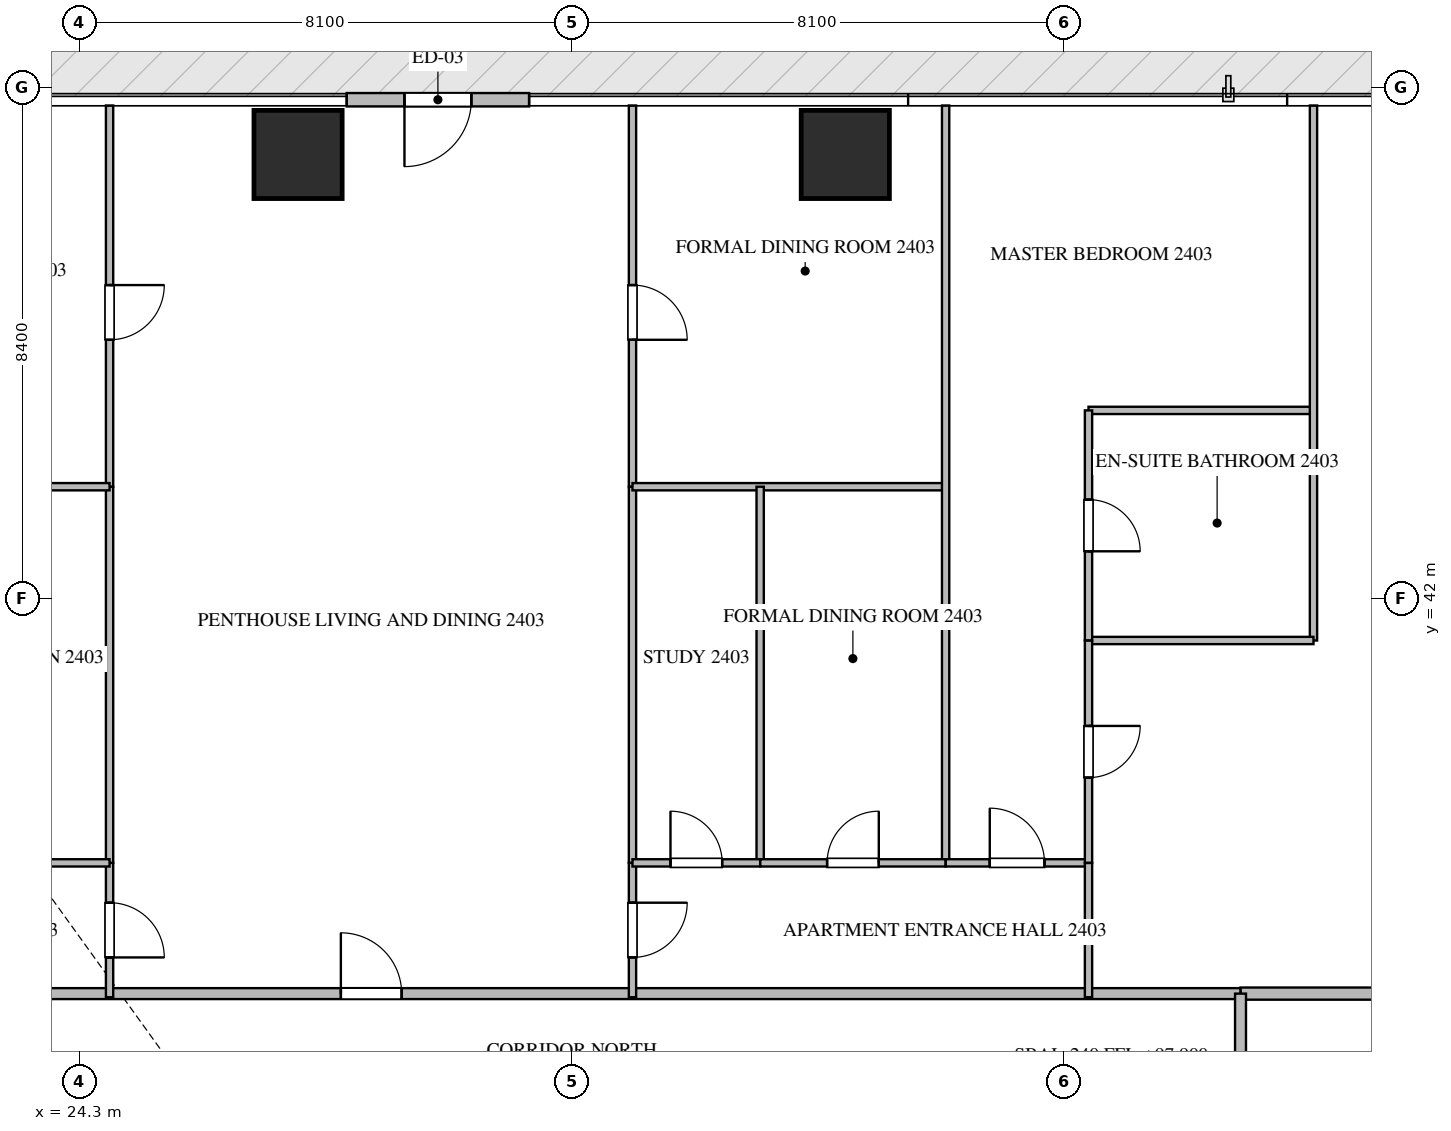
"""IFC4 building model, lengths in metres.
Left out: names, types, materials, properties, quantities, classifications, styles, units other than length and angle.
Written with IfcOpenShell. Run it as: python <this file> out.ifc"""

import sys

from ifc_helpers import new_model, si_unit, direction, frame, frame_2d, origin, origin_2d, place, context, subcontext, project, spatial, rectangle, extrude, source, transform, mapped, element, fill, save


model = new_model("IFC4")
c1 = context("Model", 3, precision=1e-05, world=origin(), true_north=direction((0.0, 1.0)))
c2 = subcontext(c1, "Body", "Model", "MODEL_VIEW")
j1 = project(units=[si_unit("LENGTHUNIT", "METRE"), si_unit("PLANEANGLEUNIT", "RADIAN")], contexts=[c1])
p1 = place(None, origin())
s1 = spatial("IfcSite", under=j1, at=p1, CompositionType="ELEMENT")
p2 = place(p1, origin())
s2 = spatial("IfcBuilding", under=s1, at=p2, CompositionType="ELEMENT")
p3 = place(p2, frame((0.0, 0.0, 97.95)))
s3 = spatial("IfcBuildingStorey", under=s2, at=p3, CompositionType="ELEMENT", Elevation=97.95)
m1 = source(origin(), c2, "Body", "SweptSolid", [
    extrude(rectangle(XDim=1.45, YDim=1.45, at=origin_2d()), origin(), (0.0, 0.0, 1.0), 3.75),
])
for number, where, z_axis, x_axis in (
    (1, (27.9, 49.3, -0.26), (0.0, 0.0, 1.0), (1.0, 0.0, 0.0)),
    (2, (36.9, 49.3, -0.26), (0.0, 0.0, 1.0), (1.0, 0.0, 0.0)),
):
    element("IfcColumn", number, at=place(p3, frame(where, z_axis=z_axis, x_axis=x_axis)), inside=s3, PredefinedType="COLUMN", context=c2, shape_type="MappedRepresentation", body=[
        mapped(m1, transform((0.0, 0.0, 0.0), scale=1.0)),
    ])
p4 = place(p3, frame((31.7, 50.2, 0.0), z_axis=(0.0, 0.0, 1.0), x_axis=(-1.0, 0.0, 0.0)))
e3 = element("IfcWall", 3, at=p4, inside=s3, PredefinedType="ELEMENTEDWALL", context=c2, shape_type="SweptSolid", body=[
    extrude(rectangle(XDim=3.0, YDim=0.22, at=frame_2d((1.5, 0.0))), origin(), (0.0, 0.0, 1.0), 3.475),
])
p5 = place(p4, frame((0.95, 0.0, 0.0)))
e4 = element("IfcOpeningElement", 4, at=p5, cuts=e3, PredefinedType="OPENING", context=c2, shape_type="SweptSolid", body=[
    extrude(rectangle(XDim=1.1, YDim=2.2, at=frame_2d((0.55, 1.1))), frame((0.0, 0.12, 0.0), z_axis=(0.0, -1.0, 0.0), x_axis=(1.0, 0.0, 0.0)), (0.0, 0.0, 1.0), 0.24),
])
p6 = place(p3, frame((43.4, 35.5, 0.0), z_axis=(0.0, 0.0, 1.0), x_axis=(1.0, 0.0, 0.0)))
e5 = element("IfcWall", 5, at=p6, inside=s3, PredefinedType="PARTITIONING", context=c2, shape_type="SweptSolid", body=[
    extrude(rectangle(XDim=15.318, YDim=0.2, at=frame_2d((7.659, 0.0))), origin(), (0.0, 0.0, 1.0), 3.49),
])
p7 = place(p3, frame((21.402, 35.5, 0.0), z_axis=(0.0, 0.0, 1.0), x_axis=(1.0, 0.0, 0.0)))
e6 = element("IfcWall", 6, at=p7, inside=s3, PredefinedType="PARTITIONING", context=c2, shape_type="SweptSolid", body=[
    extrude(rectangle(XDim=21.996, YDim=0.18, at=frame_2d((10.998, 0.0))), origin(), (0.0, 0.0, 1.0), 3.49),
])
p8 = place(p7, frame((7.202, 0.0, 0.0)))
e7 = element("IfcOpeningElement", 7, at=p8, cuts=e6, PredefinedType="OPENING", context=c2, shape_type="SweptSolid", body=[
    extrude(rectangle(XDim=1.0, YDim=2.15, at=frame_2d((0.5, 1.075))), frame((0.0, 0.1, 0.0), z_axis=(0.0, -1.0, 0.0), x_axis=(1.0, 0.0, 0.0)), (0.0, 0.0, 1.0), 0.2),
])
p9 = place(p3, frame((43.4, 14.9, 0.0), z_axis=(0.0, 0.0, 1.0), x_axis=(0.0, 1.0, 0.0)))
e8 = element("IfcWall", 8, at=p9, inside=s3, PredefinedType="PARTITIONING", context=c2, shape_type="SweptSolid", body=[
    extrude(rectangle(XDim=20.6, YDim=0.18, at=frame_2d((10.3, 0.0))), origin(), (0.0, 0.0, 1.0), 3.49),
])
p10 = place(p9, frame((1.96, 0.0, 0.0)))
e9 = element("IfcOpeningElement", 9, at=p10, cuts=e8, PredefinedType="OPENING", context=c2, shape_type="SweptSolid", body=[
    extrude(rectangle(XDim=1.0, YDim=2.15, at=frame_2d((0.5, 1.075))), frame((0.0, 0.1, 0.0), z_axis=(0.0, -1.0, 0.0), x_axis=(1.0, 0.0, 0.0)), (0.0, 0.0, 1.0), 0.2),
])
p11 = place(p3, frame((24.8, 37.65, 0.0), z_axis=(0.0, 0.0, 1.0), x_axis=(0.0, -1.0, 0.0)))
e10 = element("IfcWall", 10, at=p11, inside=s3, PredefinedType="PARTITIONING", context=c2, shape_type="SweptSolid", body=[
    extrude(rectangle(XDim=2.21, YDim=0.12, at=frame_2d((1.105, 0.0))), origin(), (0.0, 0.0, 1.0), 3.49),
])
p12 = place(p11, frame((0.655, 0.0, 0.0)))
e11 = element("IfcOpeningElement", 11, at=p12, cuts=e10, PredefinedType="OPENING", context=c2, shape_type="SweptSolid", body=[
    extrude(rectangle(XDim=0.9, YDim=2.1, at=frame_2d((0.45, 1.05))), frame((0.0, 0.07, 0.0), z_axis=(0.0, -1.0, 0.0), x_axis=(1.0, 0.0, 0.0)), (0.0, 0.0, 1.0), 0.14),
])
p13 = place(p3, frame((24.8, 50.105, 0.0), z_axis=(0.0, 0.0, 1.0), x_axis=(0.0, -1.0, 0.0)))
e12 = element("IfcWall", 12, at=p13, inside=s3, PredefinedType="PARTITIONING", context=c2, shape_type="SweptSolid", body=[
    extrude(rectangle(XDim=6.269, YDim=0.12, at=frame_2d((3.135, 0.0))), origin(), (0.0, 0.0, 1.0), 3.49),
])
p14 = place(p13, frame((2.953, 0.0, 0.0)))
e13 = element("IfcOpeningElement", 13, at=p14, cuts=e12, PredefinedType="OPENING", context=c2, shape_type="SweptSolid", body=[
    extrude(rectangle(XDim=0.9, YDim=2.1, at=frame_2d((0.45, 1.05))), frame((0.0, 0.07, 0.0), z_axis=(0.0, -1.0, 0.0), x_axis=(1.0, 0.0, 0.0)), (0.0, 0.0, 1.0), 0.14),
])
p15 = place(p3, frame((24.8, 43.834, 0.0), z_axis=(0.0, 0.0, 1.0), x_axis=(0.0, -1.0, 0.0)))
e14 = element("IfcWall", 14, at=p15, inside=s3, PredefinedType="PARTITIONING", context=c2, shape_type="SweptSolid", body=[
    extrude(rectangle(XDim=6.182, YDim=0.12, at=frame_2d((3.091, 0.0))), origin(), (0.0, 0.0, 1.0), 3.49),
])
p16 = place(p3, frame((19.65, 43.836, 0.0), z_axis=(0.0, 0.0, 1.0), x_axis=(1.0, 0.0, 0.0)))
e15 = element("IfcWall", 15, at=p16, inside=s3, PredefinedType="PARTITIONING", context=c2, shape_type="SweptSolid", body=[
    extrude(rectangle(XDim=5.15, YDim=0.12, at=frame_2d((2.575, 0.0))), origin(), (0.0, 0.0, 1.0), 3.49),
])
p17 = place(p3, frame((21.752, 37.65, 0.0), z_axis=(0.0, 0.0, 1.0), x_axis=(1.0, 0.0, 0.0)))
e16 = element("IfcWall", 16, at=p17, inside=s3, PredefinedType="PARTITIONING", context=c2, shape_type="SweptSolid", body=[
    extrude(rectangle(XDim=3.048, YDim=0.12, at=frame_2d((1.524, 0.0))), origin(), (0.0, 0.0, 1.0), 3.49),
])
p18 = place(p17, frame((1.099, 0.0, 0.0)))
e17 = element("IfcOpeningElement", 17, at=p18, cuts=e16, PredefinedType="OPENING", context=c2, shape_type="SweptSolid", body=[
    extrude(rectangle(XDim=0.85, YDim=2.1, at=frame_2d((0.425, 1.05))), frame((0.0, 0.07, 0.0), z_axis=(0.0, -1.0, 0.0), x_axis=(1.0, 0.0, 0.0)), (0.0, 0.0, 1.0), 0.14),
])
p19 = place(p3, frame((33.4, 37.65, 0.0), z_axis=(0.0, 0.0, 1.0), x_axis=(0.0, -1.0, 0.0)))
e18 = element("IfcWall", 18, at=p19, inside=s3, PredefinedType="PARTITIONING", context=c2, shape_type="SweptSolid", body=[
    extrude(rectangle(XDim=2.21, YDim=0.12, at=frame_2d((1.105, 0.0))), origin(), (0.0, 0.0, 1.0), 3.49),
])
p20 = place(p19, frame((0.655, 0.0, 0.0)))
e19 = element("IfcOpeningElement", 19, at=p20, cuts=e18, PredefinedType="OPENING", context=c2, shape_type="SweptSolid", body=[
    extrude(rectangle(XDim=0.9, YDim=2.1, at=frame_2d((0.45, 1.05))), frame((0.0, 0.07, 0.0), z_axis=(0.0, -1.0, 0.0), x_axis=(1.0, 0.0, 0.0)), (0.0, 0.0, 1.0), 0.14),
])
p21 = place(p3, frame((33.4, 50.105, 0.0), z_axis=(0.0, 0.0, 1.0), x_axis=(0.0, -1.0, 0.0)))
e20 = element("IfcWall", 20, at=p21, inside=s3, PredefinedType="PARTITIONING", context=c2, shape_type="SweptSolid", body=[
    extrude(rectangle(XDim=6.269, YDim=0.12, at=frame_2d((3.135, 0.0))), origin(), (0.0, 0.0, 1.0), 3.49),
])
p22 = place(p21, frame((2.953, 0.0, 0.0)))
e21 = element("IfcOpeningElement", 21, at=p22, cuts=e20, PredefinedType="OPENING", context=c2, shape_type="SweptSolid", body=[
    extrude(rectangle(XDim=0.9, YDim=2.1, at=frame_2d((0.45, 1.05))), frame((0.0, 0.07, 0.0), z_axis=(0.0, -1.0, 0.0), x_axis=(1.0, 0.0, 0.0)), (0.0, 0.0, 1.0), 0.14),
])
p23 = place(p3, frame((33.4, 43.834, 0.0), z_axis=(0.0, 0.0, 1.0), x_axis=(0.0, -1.0, 0.0)))
e22 = element("IfcWall", 22, at=p23, inside=s3, PredefinedType="PARTITIONING", context=c2, shape_type="SweptSolid", body=[
    extrude(rectangle(XDim=6.182, YDim=0.12, at=frame_2d((3.091, 0.0))), origin(), (0.0, 0.0, 1.0), 3.49),
])
p24 = place(p3, frame((33.4, 43.836, 0.0), z_axis=(0.0, 0.0, 1.0), x_axis=(1.0, 0.0, 0.0)))
e23 = element("IfcWall", 23, at=p24, inside=s3, PredefinedType="PARTITIONING", context=c2, shape_type="SweptSolid", body=[
    extrude(rectangle(XDim=5.15, YDim=0.12, at=frame_2d((2.575, 0.0))), origin(), (0.0, 0.0, 1.0), 3.49),
])
p25 = place(p3, frame((38.55, 50.105, 0.0), z_axis=(0.0, 0.0, 1.0), x_axis=(0.0, -1.0, 0.0)))
e24 = element("IfcWall", 24, at=p25, inside=s3, PredefinedType="PARTITIONING", context=c2, shape_type="SweptSolid", body=[
    extrude(rectangle(XDim=12.455, YDim=0.12, at=frame_2d((6.228, 0.0))), origin(), (0.0, 0.0, 1.0), 3.49),
])
p26 = place(p3, frame((35.5, 43.836, 0.0), z_axis=(0.0, 0.0, 1.0), x_axis=(0.0, -1.0, 0.0)))
e25 = element("IfcWall", 25, at=p26, inside=s3, PredefinedType="PARTITIONING", context=c2, shape_type="SweptSolid", body=[
    extrude(rectangle(XDim=6.186, YDim=0.12, at=frame_2d((3.093, 0.0))), origin(), (0.0, 0.0, 1.0), 3.49),
])
p27 = place(p3, frame((33.4, 37.65, 0.0), z_axis=(0.0, 0.0, 1.0), x_axis=(1.0, 0.0, 0.0)))
e26 = element("IfcWall", 26, at=p27, inside=s3, PredefinedType="PARTITIONING", context=c2, shape_type="SweptSolid", body=[
    extrude(rectangle(XDim=2.1, YDim=0.12, at=frame_2d((1.05, 0.0))), origin(), (0.0, 0.0, 1.0), 3.49),
])
p28 = place(p27, frame((0.625, 0.0, 0.0)))
e27 = element("IfcOpeningElement", 27, at=p28, cuts=e26, PredefinedType="OPENING", context=c2, shape_type="SweptSolid", body=[
    extrude(rectangle(XDim=0.85, YDim=2.1, at=frame_2d((0.425, 1.05))), frame((0.0, 0.07, 0.0), z_axis=(0.0, -1.0, 0.0), x_axis=(1.0, 0.0, 0.0)), (0.0, 0.0, 1.0), 0.14),
])
p29 = place(p3, frame((35.502, 37.65, 0.0), z_axis=(0.0, 0.0, 1.0), x_axis=(1.0, 0.0, 0.0)))
e28 = element("IfcWall", 28, at=p29, inside=s3, PredefinedType="PARTITIONING", context=c2, shape_type="SweptSolid", body=[
    extrude(rectangle(XDim=3.048, YDim=0.12, at=frame_2d((1.524, 0.0))), origin(), (0.0, 0.0, 1.0), 3.49),
])
p30 = place(p29, frame((1.099, 0.0, 0.0)))
e29 = element("IfcOpeningElement", 29, at=p30, cuts=e28, PredefinedType="OPENING", context=c2, shape_type="SweptSolid", body=[
    extrude(rectangle(XDim=0.85, YDim=2.1, at=frame_2d((0.425, 1.05))), frame((0.0, 0.07, 0.0), z_axis=(0.0, -1.0, 0.0), x_axis=(1.0, 0.0, 0.0)), (0.0, 0.0, 1.0), 0.14),
])
p31 = place(p3, frame((38.552, 37.65, 0.0), z_axis=(0.0, 0.0, 1.0), x_axis=(1.0, 0.0, 0.0)))
e30 = element("IfcWall", 30, at=p31, inside=s3, PredefinedType="PARTITIONING", context=c2, shape_type="SweptSolid", body=[
    extrude(rectangle(XDim=2.348, YDim=0.12, at=frame_2d((1.174, 0.0))), origin(), (0.0, 0.0, 1.0), 3.49),
])
p32 = place(p31, frame((0.724, 0.0, 0.0)))
e31 = element("IfcOpeningElement", 31, at=p32, cuts=e30, PredefinedType="OPENING", context=c2, shape_type="SweptSolid", body=[
    extrude(rectangle(XDim=0.9, YDim=2.1, at=frame_2d((0.45, 1.05))), frame((0.0, 0.07, 0.0), z_axis=(0.0, -1.0, 0.0), x_axis=(1.0, 0.0, 0.0)), (0.0, 0.0, 1.0), 0.14),
])
p33 = place(p3, frame((40.9, 45.091, 0.0), z_axis=(0.0, 0.0, 1.0), x_axis=(1.0, 0.0, 0.0)))
e32 = element("IfcWall", 32, at=p33, inside=s3, PredefinedType="PARTITIONING", context=c2, shape_type="SweptSolid", body=[
    extrude(rectangle(XDim=3.7, YDim=0.12, at=frame_2d((1.85, 0.0))), origin(), (0.0, 0.0, 1.0), 3.49),
])
p34 = place(p3, frame((44.6, 50.105, 0.0), z_axis=(0.0, 0.0, 1.0), x_axis=(0.0, -1.0, 0.0)))
e33 = element("IfcWall", 33, at=p34, inside=s3, PredefinedType="PARTITIONING", context=c2, shape_type="SweptSolid", body=[
    extrude(rectangle(XDim=8.798, YDim=0.12, at=frame_2d((4.399, 0.0))), origin(), (0.0, 0.0, 1.0), 3.49),
])
p35 = place(p3, frame((40.9, 41.307, 0.0), z_axis=(0.0, 0.0, 1.0), x_axis=(1.0, 0.0, 0.0)))
e34 = element("IfcWall", 34, at=p35, inside=s3, PredefinedType="PARTITIONING", context=c2, shape_type="SweptSolid", body=[
    extrude(rectangle(XDim=3.7, YDim=0.12, at=frame_2d((1.85, 0.0))), origin(), (0.0, 0.0, 1.0), 3.49),
])
p36 = place(p3, frame((40.9, 45.091, 0.0), z_axis=(0.0, 0.0, 1.0), x_axis=(0.0, -1.0, 0.0)))
e35 = element("IfcWall", 35, at=p36, inside=s3, PredefinedType="PARTITIONING", context=c2, shape_type="SweptSolid", body=[
    extrude(rectangle(XDim=3.784, YDim=0.12, at=frame_2d((1.892, 0.0))), origin(), (0.0, 0.0, 1.0), 3.49),
])
p37 = place(p36, frame((1.467, 0.0, 0.0)))
e36 = element("IfcOpeningElement", 36, at=p37, cuts=e35, PredefinedType="OPENING", context=c2, shape_type="SweptSolid", body=[
    extrude(rectangle(XDim=0.85, YDim=2.1, at=frame_2d((0.425, 1.05))), frame((0.0, 0.07, 0.0), z_axis=(0.0, -1.0, 0.0), x_axis=(1.0, 0.0, 0.0)), (0.0, 0.0, 1.0), 0.14),
])
p38 = place(p3, frame((40.9, 41.305, 0.0), z_axis=(0.0, 0.0, 1.0), x_axis=(0.0, -1.0, 0.0)))
e37 = element("IfcWall", 37, at=p38, inside=s3, PredefinedType="PARTITIONING", context=c2, shape_type="SweptSolid", body=[
    extrude(rectangle(XDim=3.655, YDim=0.12, at=frame_2d((1.828, 0.0))), origin(), (0.0, 0.0, 1.0), 3.49),
])
p39 = place(p38, frame((1.403, 0.0, 0.0)))
e38 = element("IfcOpeningElement", 38, at=p39, cuts=e37, PredefinedType="OPENING", context=c2, shape_type="SweptSolid", body=[
    extrude(rectangle(XDim=0.85, YDim=2.1, at=frame_2d((0.425, 1.05))), frame((0.0, 0.07, 0.0), z_axis=(0.0, -1.0, 0.0), x_axis=(1.0, 0.0, 0.0)), (0.0, 0.0, 1.0), 0.14),
])
p40 = place(p3, frame((40.9, 37.648, 0.0), z_axis=(0.0, 0.0, 1.0), x_axis=(0.0, -1.0, 0.0)))
e39 = element("IfcWall", 39, at=p40, inside=s3, PredefinedType="PARTITIONING", context=c2, shape_type="SweptSolid", body=[
    extrude(rectangle(XDim=2.208, YDim=0.12, at=frame_2d((1.104, 0.0))), origin(), (0.0, 0.0, 1.0), 3.49),
])
m2 = source(origin(), c2, "Body", "SweptSolid", [
    extrude(rectangle(XDim=1.1, YDim=2.2, at=frame_2d((0.55, 1.1))), frame((0.0, 0.025, 0.0), z_axis=(0.0, -1.0, 0.0), x_axis=(1.0, 0.0, 0.0)), (0.0, 0.0, 1.0), 0.05),
])
p41 = place(p5, origin())
e40 = element("IfcDoor", 40, at=p41, inside=s3, OperationType="SINGLE_SWING_RIGHT", PredefinedType="DOOR", context=c2, shape_type="MappedRepresentation", body=[
    mapped(m2, transform((0.0, 0.0, 0.0), scale=1.0)),
])
fill(e4, e40)
m3 = source(origin(), c2, "Body", "SweptSolid", [
    extrude(rectangle(XDim=1.0, YDim=2.15, at=frame_2d((0.5, 1.075))), frame((0.0, 0.025, 0.0), z_axis=(0.0, -1.0, 0.0), x_axis=(1.0, 0.0, 0.0)), (0.0, 0.0, 1.0), 0.05),
])
p42 = place(p8, origin())
e41 = element("IfcDoor", 41, at=p42, inside=s3, OperationType="SINGLE_SWING_LEFT", PredefinedType="DOOR", context=c2, shape_type="MappedRepresentation", body=[
    mapped(m3, transform((0.0, 0.0, 0.0), scale=1.0)),
])
fill(e7, e41)
m4 = source(origin(), c2, "Body", "SweptSolid", [
    extrude(rectangle(XDim=0.9, YDim=2.1, at=frame_2d((0.45, 1.05))), frame((0.0, 0.025, 0.0), z_axis=(0.0, -1.0, 0.0), x_axis=(1.0, 0.0, 0.0)), (0.0, 0.0, 1.0), 0.05),
])
p43 = place(p12, origin())
e42 = element("IfcDoor", 42, at=p43, inside=s3, OperationType="SINGLE_SWING_RIGHT", PredefinedType="DOOR", context=c2, shape_type="MappedRepresentation", body=[
    mapped(m4, transform((0.0, 0.0, 0.0), scale=1.0)),
])
fill(e11, e42)
p44 = place(p14, origin())
e43 = element("IfcDoor", 43, at=p44, inside=s3, OperationType="SINGLE_SWING_LEFT", PredefinedType="DOOR", context=c2, shape_type="MappedRepresentation", body=[
    mapped(m4, transform((0.0, 0.0, 0.0), scale=1.0)),
])
fill(e13, e43)
p45 = place(p20, origin())
e44 = element("IfcDoor", 44, at=p45, inside=s3, OperationType="SINGLE_SWING_LEFT", PredefinedType="DOOR", context=c2, shape_type="MappedRepresentation", body=[
    mapped(m4, transform((0.0, 0.0, 0.0), scale=1.0)),
])
fill(e19, e44)
p46 = place(p22, origin())
e45 = element("IfcDoor", 45, at=p46, inside=s3, OperationType="SINGLE_SWING_RIGHT", PredefinedType="DOOR", context=c2, shape_type="MappedRepresentation", body=[
    mapped(m4, transform((0.0, 0.0, 0.0), scale=1.0)),
])
fill(e21, e45)
m5 = source(origin(), c2, "Body", "SweptSolid", [
    extrude(rectangle(XDim=0.85, YDim=2.1, at=frame_2d((0.425, 1.05))), frame((0.0, 0.025, 0.0), z_axis=(0.0, -1.0, 0.0), x_axis=(1.0, 0.0, 0.0)), (0.0, 0.0, 1.0), 0.05),
])
p47 = place(p28, origin())
e46 = element("IfcDoor", 46, at=p47, inside=s3, OperationType="SINGLE_SWING_LEFT", PredefinedType="DOOR", context=c2, shape_type="MappedRepresentation", body=[
    mapped(m5, transform((0.0, 0.0, 0.0), scale=1.0)),
])
fill(e27, e46)
p48 = place(p30, origin())
e47 = element("IfcDoor", 47, at=p48, inside=s3, OperationType="SINGLE_SWING_RIGHT", PredefinedType="DOOR", context=c2, shape_type="MappedRepresentation", body=[
    mapped(m5, transform((0.0, 0.0, 0.0), scale=1.0)),
])
fill(e29, e47)
p49 = place(p32, origin())
e48 = element("IfcDoor", 48, at=p49, inside=s3, OperationType="SINGLE_SWING_LEFT", PredefinedType="DOOR", context=c2, shape_type="MappedRepresentation", body=[
    mapped(m4, transform((0.0, 0.0, 0.0), scale=1.0)),
])
fill(e31, e48)
p50 = place(p37, origin())
e49 = element("IfcDoor", 49, at=p50, inside=s3, OperationType="SINGLE_SWING_RIGHT", PredefinedType="DOOR", context=c2, shape_type="MappedRepresentation", body=[
    mapped(m5, transform((0.0, 0.0, 0.0), scale=1.0)),
])
fill(e36, e49)
p51 = place(p39, origin())
e50 = element("IfcDoor", 50, at=p51, inside=s3, OperationType="SINGLE_SWING_LEFT", PredefinedType="DOOR", context=c2, shape_type="MappedRepresentation", body=[
    mapped(m5, transform((0.0, 0.0, 0.0), scale=1.0)),
])
fill(e38, e50)
save(model, sys.argv[1])
